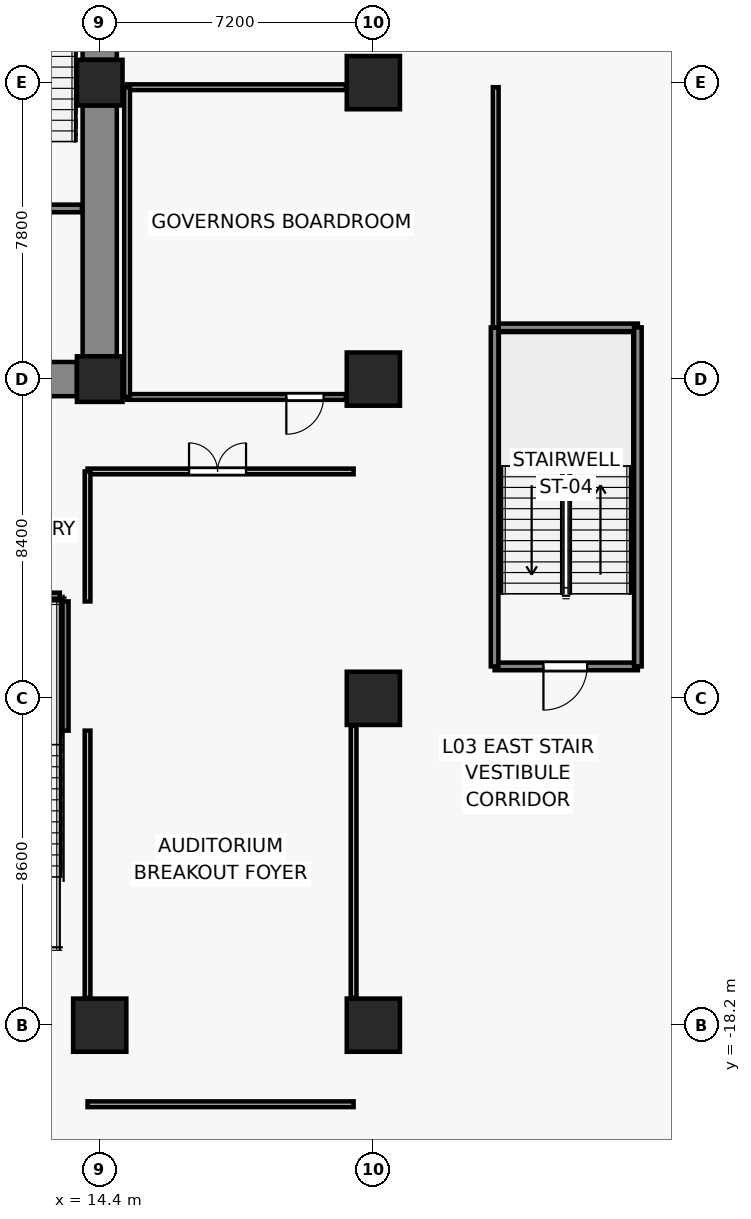
"""IFC4 building model, lengths in metres.
Left out: names, types, materials, properties, quantities, classifications, styles, units other than length and angle.
Written with IfcOpenShell. Run it as: python <this file> out.ifc"""

import sys

from ifc_helpers import new_model, si_unit, direction, frame, frame_2d, origin, origin_2d, place, context, subcontext, project, spatial, rectangle, extrude, source, transform, mapped, element, fill, save


model = new_model("IFC4")
c1 = context("Model", 3, precision=1e-05, world=origin(), true_north=direction((0.0, 1.0)))
c2 = subcontext(c1, "Body", "Model", "MODEL_VIEW")
j1 = project(units=[si_unit("LENGTHUNIT", "METRE"), si_unit("PLANEANGLEUNIT", "RADIAN")], contexts=[c1])
p1 = place(None, origin())
s1 = spatial("IfcSite", under=j1, at=p1, CompositionType="ELEMENT")
p2 = place(p1, origin())
s2 = spatial("IfcBuilding", under=s1, at=p2, CompositionType="ELEMENT")
p3 = place(p2, frame((0.0, 0.0, 13.8)))
s3 = spatial("IfcBuildingStorey", under=s2, at=p3, CompositionType="ELEMENT", Elevation=13.8)
for number, where, z_axis, x_axis in (
    (1, (14.4, -1.2, 0.0), (0.0, 0.0, 1.0), (1.0, 0.0, 0.0)),
    (2, (14.4, 6.6, 0.0), (0.0, 0.0, 1.0), (1.0, 0.0, 0.0)),
):
    element("IfcColumn", number, at=place(p3, frame(where, z_axis=z_axis, x_axis=x_axis)), inside=s3, PredefinedType="COLUMN", context=c2, shape_type="SweptSolid", body=[
        extrude(rectangle(XDim=1.2, YDim=1.2, at=origin_2d()), origin(), (0.0, 0.0, 1.0), 4.4),
    ])
for number, where, z_axis, x_axis in (
    (3, (14.4, -18.2, 0.0), (0.0, 0.0, 1.0), (1.0, 0.0, 0.0)),
    (4, (21.6, -18.2, 0.0), (0.0, 0.0, 1.0), (1.0, 0.0, 0.0)),
    (5, (21.6, -9.6, 0.0), (0.0, 0.0, 1.0), (1.0, 0.0, 0.0)),
    (6, (21.6, -1.2, 0.0), (0.0, 0.0, 1.0), (1.0, 0.0, 0.0)),
    (7, (21.6, 6.6, 0.0), (0.0, 0.0, 1.0), (1.0, 0.0, 0.0)),
):
    element("IfcColumn", number, at=place(p3, frame(where, z_axis=z_axis, x_axis=x_axis)), inside=s3, PredefinedType="COLUMN", context=c2, shape_type="SweptSolid", body=[
        extrude(rectangle(XDim=1.4, YDim=1.4, at=origin_2d()), origin(), (0.0, 0.0, 1.0), 4.4),
    ])
p4 = place(p3, frame((14.4, -0.6, 0.0), z_axis=(0.0, 0.0, 1.0), x_axis=(0.0, 1.0, 0.0)))
e8 = element("IfcWall", 8, at=p4, inside=s3, PredefinedType="SHEAR", context=c2, shape_type="SweptSolid", body=[
    extrude(rectangle(XDim=6.6, YDim=0.9, at=frame_2d((3.3, 0.0))), origin(), (0.0, 0.0, 1.0), 4.1),
])
p5 = place(p3, frame((14.4, 7.2, 0.0), z_axis=(0.0, 0.0, 1.0), x_axis=(0.0, 1.0, 0.0)))
e9 = element("IfcWall", 9, at=p5, inside=s3, PredefinedType="SHEAR", context=c2, shape_type="SweptSolid", body=[
    extrude(rectangle(XDim=5.7, YDim=0.9, at=frame_2d((2.85, 0.0))), origin(), (0.0, 0.0, 1.0), 4.1),
])
p6 = place(p3, frame((13.8, -1.2, 0.0), z_axis=(0.0, 0.0, 1.0), x_axis=(-1.0, 0.0, 0.0)))
e10 = element("IfcWall", 10, at=p6, inside=s3, PredefinedType="SHEAR", context=c2, shape_type="SweptSolid", body=[
    extrude(rectangle(XDim=6.0, YDim=0.9, at=frame_2d((3.0, 0.0))), origin(), (0.0, 0.0, 1.0), 4.1),
])
p7 = place(p6, frame((2.325, 0.0, 0.0)))
e11 = element("IfcOpeningElement", 11, at=p7, cuts=e10, PredefinedType="OPENING", context=c2, shape_type="SweptSolid", body=[
    extrude(rectangle(XDim=1.15, YDim=2.15, at=frame_2d((0.575, 1.075))), frame((0.0, 0.46, 0.0), z_axis=(0.0, -1.0, 0.0), x_axis=(1.0, 0.0, 0.0)), (0.0, 0.0, 1.0), 0.92),
])
p8 = place(p3, frame((13.48, -7.05, 0.0), z_axis=(0.0, 0.0, 1.0), x_axis=(0.0, -1.0, 0.0)))
e12 = element("IfcWall", 12, at=p8, inside=s3, PredefinedType="SOLIDWALL", context=c2, shape_type="SweptSolid", body=[
    extrude(rectangle(XDim=3.4, YDim=0.2, at=frame_2d((1.7, 0.0))), origin(), (0.0, 0.0, 1.0), 4.1),
])
p9 = place(p3, frame((9.65, -6.92, 0.0), z_axis=(0.0, 0.0, 1.0), x_axis=(1.0, 0.0, 0.0)))
e13 = element("IfcWall", 13, at=p9, inside=s3, PredefinedType="SOLIDWALL", context=c2, shape_type="SweptSolid", body=[
    extrude(rectangle(XDim=3.7, YDim=0.2, at=frame_2d((1.85, 0.0))), origin(), (0.0, 0.0, 1.0), 4.1),
])
p10 = place(p3, frame((13.93, 3.29, 0.0), z_axis=(0.0, 0.0, 1.0), x_axis=(-1.0, 0.0, 0.0)))
e14 = element("IfcWall", 14, at=p10, inside=s3, PredefinedType="SOLIDWALL", context=c2, shape_type="SweptSolid", body=[
    extrude(rectangle(XDim=3.52, YDim=0.2, at=frame_2d((1.76, 0.0))), origin(), (0.0, 0.0, 1.0), 4.1),
])
p11 = place(p10, frame((1.205, 0.0, 0.0)))
e15 = element("IfcOpeningElement", 15, at=p11, cuts=e14, PredefinedType="OPENING", context=c2, shape_type="SweptSolid", body=[
    extrude(rectangle(XDim=1.15, YDim=2.15, at=frame_2d((0.575, 1.075))), frame((0.0, 0.11, 0.0), z_axis=(0.0, -1.0, 0.0), x_axis=(1.0, 0.0, 0.0)), (0.0, 0.0, 1.0), 0.22),
])
p12 = place(p3, frame((28.56, -8.76, 0.0), z_axis=(0.0, 0.0, 1.0), x_axis=(-1.0, 0.0, 0.0)))
e16 = element("IfcWall", 16, at=p12, inside=s3, PredefinedType="SOLIDWALL", context=c2, shape_type="SweptSolid", body=[
    extrude(rectangle(XDim=3.77, YDim=0.2, at=frame_2d((1.885, 0.0))), origin(), (0.0, 0.0, 1.0), 4.1),
])
p13 = place(p12, frame((1.335, 0.0, 0.0)))
e17 = element("IfcOpeningElement", 17, at=p13, cuts=e16, PredefinedType="OPENING", context=c2, shape_type="SweptSolid", body=[
    extrude(rectangle(XDim=1.15, YDim=2.15, at=frame_2d((0.575, 1.075))), frame((0.0, 0.11, 0.0), z_axis=(0.0, -1.0, 0.0), x_axis=(1.0, 0.0, 0.0)), (0.0, 0.0, 1.0), 0.22),
])
p14 = place(p3, frame((24.79, 0.16, 0.0), z_axis=(0.0, 0.0, 1.0), x_axis=(1.0, 0.0, 0.0)))
e18 = element("IfcWall", 18, at=p14, inside=s3, PredefinedType="SOLIDWALL", context=c2, shape_type="SweptSolid", body=[
    extrude(rectangle(XDim=3.77, YDim=0.2, at=frame_2d((1.885, 0.0))), origin(), (0.0, 0.0, 1.0), 4.1),
])
for number, where, z_axis, x_axis in (
    (19, (24.79, -8.76, 0.0), (0.0, 0.0, 1.0), (0.0, 1.0, 0.0)),
    (20, (28.56, 0.16, 0.0), (0.0, 0.0, 1.0), (0.0, -1.0, 0.0)),
):
    element("IfcWall", number, at=place(p3, frame(where, z_axis=z_axis, x_axis=x_axis)), inside=s3, PredefinedType="SOLIDWALL", context=c2, shape_type="SweptSolid", body=[
        extrude(rectangle(XDim=8.92, YDim=0.2, at=frame_2d((4.46, 0.0))), origin(), (0.0, 0.0, 1.0), 4.1),
    ])
p15 = place(p3, frame((21.08, -20.28, 0.0), z_axis=(0.0, 0.0, 1.0), x_axis=(-1.0, 0.0, 0.0)))
e21 = element("IfcWall", 21, at=p15, inside=s3, PredefinedType="PARTITIONING", context=c2, shape_type="SweptSolid", body=[
    extrude(rectangle(XDim=7.0, YDim=0.15, at=frame_2d((3.5, 0.0))), origin(), (0.0, 0.0, 1.0), 4.1),
])
p16 = place(p3, frame((14.08, -3.63, 0.0), z_axis=(0.0, 0.0, 1.0), x_axis=(1.0, 0.0, 0.0)))
e22 = element("IfcWall", 22, at=p16, inside=s3, PredefinedType="PARTITIONING", context=c2, shape_type="SweptSolid", body=[
    extrude(rectangle(XDim=7.0, YDim=0.15, at=frame_2d((3.5, 0.0))), origin(), (0.0, 0.0, 1.0), 3.239),
])
p17 = place(p16, frame((2.67, 0.0, 0.0)))
e23 = element("IfcOpeningElement", 23, at=p17, cuts=e22, PredefinedType="OPENING", context=c2, shape_type="SweptSolid", body=[
    extrude(rectangle(XDim=1.5, YDim=2.2, at=frame_2d((0.75, 1.1))), frame((0.0, 0.085, 0.0), z_axis=(0.0, -1.0, 0.0), x_axis=(1.0, 0.0, 0.0)), (0.0, 0.0, 1.0), 0.17),
])
p18 = place(p3, frame((14.08, -17.48, 0.0), z_axis=(0.0, 0.0, 1.0), x_axis=(0.0, 1.0, 0.0)))
e24 = element("IfcWall", 24, at=p18, inside=s3, PredefinedType="PARTITIONING", context=c2, shape_type="SweptSolid", body=[
    extrude(rectangle(XDim=7.03, YDim=0.15, at=frame_2d((3.515, 0.0))), origin(), (0.0, 0.0, 1.0), 3.29),
])
p19 = place(p3, frame((14.08, -7.05, 0.0), z_axis=(0.0, 0.0, 1.0), x_axis=(0.0, 1.0, 0.0)))
e25 = element("IfcWall", 25, at=p19, inside=s3, PredefinedType="PARTITIONING", context=c2, shape_type="SweptSolid", body=[
    extrude(rectangle(XDim=3.42, YDim=0.15, at=frame_2d((1.71, 0.0))), origin(), (0.0, 0.0, 1.0), 3.29),
])
p20 = place(p3, frame((21.08, -10.32, 0.0), z_axis=(0.0, 0.0, 1.0), x_axis=(0.0, -1.0, 0.0)))
e26 = element("IfcWall", 26, at=p20, inside=s3, PredefinedType="PARTITIONING", context=c2, shape_type="SweptSolid", body=[
    extrude(rectangle(XDim=7.16, YDim=0.15, at=frame_2d((3.58, 0.0))), origin(), (0.0, 0.0, 1.0), 3.29),
])
p21 = place(p3, frame((20.88, -1.67, 0.0), z_axis=(0.0, 0.0, 1.0), x_axis=(-1.0, 0.0, 0.0)))
e27 = element("IfcWall", 27, at=p21, inside=s3, PredefinedType="PARTITIONING", context=c2, shape_type="SweptSolid", body=[
    extrude(rectangle(XDim=5.76, YDim=0.15, at=frame_2d((2.88, 0.0))), origin(), (0.0, 0.0, 1.0), 4.1),
])
p22 = place(p21, frame((0.59, 0.0, 0.0)))
e28 = element("IfcOpeningElement", 28, at=p22, cuts=e27, PredefinedType="OPENING", context=c2, shape_type="SweptSolid", body=[
    extrude(rectangle(XDim=0.98, YDim=2.15, at=frame_2d((0.49, 1.075))), frame((0.0, 0.085, 0.0), z_axis=(0.0, -1.0, 0.0), x_axis=(1.0, 0.0, 0.0)), (0.0, 0.0, 1.0), 0.17),
])
p23 = place(p3, frame((15.12, 6.48, 0.0), z_axis=(0.0, 0.0, 1.0), x_axis=(1.0, 0.0, 0.0)))
e29 = element("IfcWall", 29, at=p23, inside=s3, PredefinedType="PARTITIONING", context=c2, shape_type="SweptSolid", body=[
    extrude(rectangle(XDim=5.76, YDim=0.15, at=frame_2d((2.88, 0.0))), origin(), (0.0, 0.0, 1.0), 3.19),
])
p24 = place(p3, frame((15.12, -1.67, 0.0), z_axis=(0.0, 0.0, 1.0), x_axis=(0.0, 1.0, 0.0)))
e30 = element("IfcWall", 30, at=p24, inside=s3, PredefinedType="PARTITIONING", context=c2, shape_type="SweptSolid", body=[
    extrude(rectangle(XDim=8.15, YDim=0.15, at=frame_2d((4.075, 0.0))), origin(), (0.0, 0.0, 1.0), 3.19),
])
p25 = place(p3, frame((24.82, 6.48, 0.0), z_axis=(0.0, 0.0, 1.0), x_axis=(0.0, -1.0, 0.0)))
e31 = element("IfcWall", 31, at=p25, inside=s3, PredefinedType="PARTITIONING", context=c2, shape_type="SweptSolid", body=[
    extrude(rectangle(XDim=6.32, YDim=0.15, at=frame_2d((3.16, 0.0))), origin(), (0.0, 0.0, 1.0), 3.19),
])
m1 = source(origin(), c2, "Body", "SweptSolid", [
    extrude(rectangle(XDim=1.15, YDim=2.15, at=frame_2d((0.575, 1.075))), frame((0.0, 0.025, 0.0), z_axis=(0.0, -1.0, 0.0), x_axis=(1.0, 0.0, 0.0)), (0.0, 0.0, 1.0), 0.05),
])
p26 = place(p13, origin())
e32 = element("IfcDoor", 32, at=p26, inside=s3, OperationType="SINGLE_SWING_RIGHT", PredefinedType="DOOR", context=c2, shape_type="MappedRepresentation", body=[
    mapped(m1, transform((0.0, 0.0, 0.0), x_axis=(1.0, 0.0, 0.0), y_axis=(0.0, 1.0, 0.0), z_axis=(0.0, 0.0, 1.0), scale=1.0)),
])
fill(e17, e32)
m2 = source(origin(), c2, "Body", "SweptSolid", [
    extrude(rectangle(XDim=1.5, YDim=2.2, at=frame_2d((0.75, 1.1))), frame((0.0, 0.025, 0.0), z_axis=(0.0, -1.0, 0.0), x_axis=(1.0, 0.0, 0.0)), (0.0, 0.0, 1.0), 0.05),
])
p27 = place(p17, origin())
e33 = element("IfcDoor", 33, at=p27, inside=s3, OperationType="DOUBLE_DOOR_SINGLE_SWING", PredefinedType="DOOR", context=c2, shape_type="MappedRepresentation", body=[
    mapped(m2, transform((0.0, 0.0, 0.0), x_axis=(1.0, 0.0, 0.0), y_axis=(0.0, 1.0, 0.0), z_axis=(0.0, 0.0, 1.0), scale=1.0)),
])
fill(e23, e33)
m3 = source(origin(), c2, "Body", "SweptSolid", [
    extrude(rectangle(XDim=0.98, YDim=2.15, at=frame_2d((0.49, 1.075))), frame((0.0, 0.025, 0.0), z_axis=(0.0, -1.0, 0.0), x_axis=(1.0, 0.0, 0.0)), (0.0, 0.0, 1.0), 0.05),
])
p28 = place(p22, origin())
e34 = element("IfcDoor", 34, at=p28, inside=s3, OperationType="SINGLE_SWING_RIGHT", PredefinedType="DOOR", context=c2, shape_type="MappedRepresentation", body=[
    mapped(m3, transform((0.0, 0.0, 0.0), x_axis=(1.0, 0.0, 0.0), y_axis=(0.0, 1.0, 0.0), z_axis=(0.0, 0.0, 1.0), scale=1.0)),
])
fill(e28, e34)
save(model, sys.argv[1])
